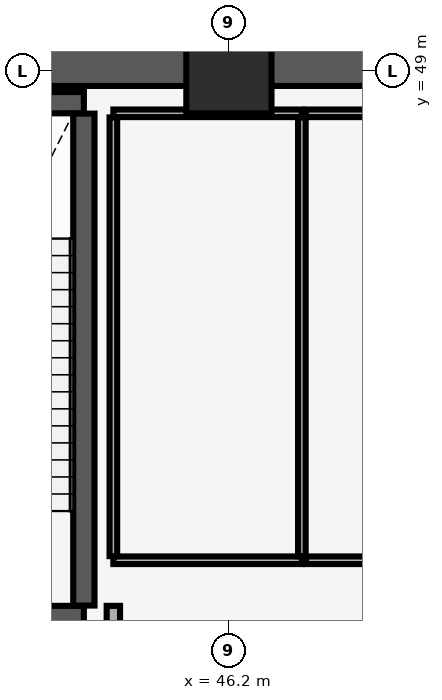
"""IFC4 building model, lengths in metres.
Left out: names, types, materials, properties, quantities, classifications, styles, units other than length and angle.
Written with IfcOpenShell. Run it as: python <this file> out.ifc"""

import sys

from ifc_helpers import new_model, si_unit, direction, frame, frame_2d, origin, origin_2d, place, context, subcontext, project, spatial, rectangle, extrude, element, fill, save


model = new_model("IFC4")
c1 = context("Model", 3, precision=1e-05, world=origin(), true_north=direction((0.0, 1.0)))
c2 = subcontext(c1, "Body", "Model", "MODEL_VIEW")
j1 = project(units=[si_unit("LENGTHUNIT", "METRE"), si_unit("PLANEANGLEUNIT", "RADIAN")], contexts=[c1])
p1 = place(None, origin())
s1 = spatial("IfcSite", under=j1, at=p1, CompositionType="ELEMENT")
p2 = place(p1, origin())
s2 = spatial("IfcBuilding", under=s1, at=p2, CompositionType="ELEMENT")
p3 = place(p2, frame((0.0, 0.0, 8.0)))
s3 = spatial("IfcBuildingStorey", under=s2, at=p3, CompositionType="ELEMENT", Elevation=8.0)
p4 = place(p3, frame((46.2, 49.0, 0.0), z_axis=(0.0, 0.0, 1.0), x_axis=(1.0, 0.0, 0.0)))
e1 = element("IfcColumn", 1, at=p4, inside=s3, PredefinedType="COLUMN", context=c2, shape_type="SweptSolid", body=[
    extrude(rectangle(XDim=1.4, YDim=1.4, at=origin_2d()), origin(), (0.0, 0.0, 1.0), 5.68),
])
p5 = place(p3, frame((16.2, 49.3, 0.0), z_axis=(0.0, 0.0, 1.0), x_axis=(1.0, 0.0, 0.0)))
e2 = element("IfcWall", 2, at=p5, inside=s3, PredefinedType="SHEAR", context=c2, shape_type="SweptSolid", body=[
    extrude(rectangle(XDim=51.6, YDim=1.1, at=frame_2d((25.8, 0.0))), origin(), (0.0, 0.0, 1.0), 5.68),
])
p6 = place(p3, frame((40.185, 40.025, 0.0), z_axis=(0.0, 0.0, 1.0), x_axis=(1.0, 0.0, 0.0)))
e3 = element("IfcWall", 3, at=p6, inside=s3, PredefinedType="SHEAR", context=c2, shape_type="SweptSolid", body=[
    extrude(rectangle(XDim=3.63, YDim=0.35, at=frame_2d((1.815, 0.0))), origin(), (0.0, 0.0, 1.0), 5.68),
])
p7 = place(p6, frame((1.24, 0.0, 0.0)))
e4 = element("IfcOpeningElement", 4, at=p7, cuts=e3, PredefinedType="OPENING", context=c2, shape_type="SweptSolid", body=[
    extrude(rectangle(XDim=1.15, YDim=2.15, at=frame_2d((0.575, 1.075))), frame((0.0, 0.185, 0.0), z_axis=(0.0, -1.0, 0.0), x_axis=(1.0, 0.0, 0.0)), (0.0, 0.0, 1.0), 0.37),
])
p8 = place(p3, frame((40.185, 48.475, 0.0), z_axis=(0.0, 0.0, 1.0), x_axis=(1.0, 0.0, 0.0)))
e5 = element("IfcWall", 5, at=p8, inside=s3, PredefinedType="SHEAR", context=c2, shape_type="SweptSolid", body=[
    extrude(rectangle(XDim=3.63, YDim=0.35, at=frame_2d((1.815, 0.0))), origin(), (0.0, 0.0, 1.0), 5.68),
])
p9 = place(p3, frame((43.815, 40.205, 0.0), z_axis=(0.0, 0.0, 1.0), x_axis=(0.0, 1.0, 0.0)))
e6 = element("IfcWall", 6, at=p9, inside=s3, PredefinedType="SHEAR", context=c2, shape_type="SweptSolid", body=[
    extrude(rectangle(XDim=8.09, YDim=0.35, at=frame_2d((4.045, 0.0))), origin(), (0.0, 0.0, 1.0), 5.68),
])
p10 = place(p3, frame((44.3, 34.415, 0.0), z_axis=(0.0, 0.0, 1.0), x_axis=(0.0, 1.0, 0.0)))
e7 = element("IfcWall", 7, at=p10, inside=s3, PredefinedType="PARTITIONING", context=c2, shape_type="SweptSolid", body=[
    extrude(rectangle(XDim=5.785, YDim=0.22, at=frame_2d((2.893, 0.0))), origin(), (0.0, 0.0, 1.0), 5.68),
])
p11 = place(p3, frame((44.3, 40.95, 0.0), z_axis=(0.0, 0.0, 1.0), x_axis=(1.0, 0.0, 0.0)))
e8 = element("IfcWall", 8, at=p11, inside=s3, PredefinedType="PARTITIONING", context=c2, shape_type="SweptSolid", body=[
    extrude(rectangle(XDim=3.1, YDim=0.125, at=frame_2d((1.55, 0.0))), origin(), (0.0, 0.0, 1.0), 5.68),
])
p12 = place(p11, frame((1.1, 0.0, 0.0)))
e9 = element("IfcOpeningElement", 9, at=p12, cuts=e8, PredefinedType="OPENING", context=c2, shape_type="SweptSolid", body=[
    extrude(rectangle(XDim=0.9, YDim=2.1, at=frame_2d((0.45, 1.05))), frame((0.0, 0.073, 0.0), z_axis=(0.0, -1.0, 0.0), x_axis=(1.0, 0.0, 0.0)), (0.0, 0.0, 1.0), 0.145),
])
p13 = place(p3, frame((44.3, 48.3, 0.0), z_axis=(0.0, 0.0, 1.0), x_axis=(1.0, 0.0, 0.0)))
e10 = element("IfcWall", 10, at=p13, inside=s3, PredefinedType="PARTITIONING", context=c2, shape_type="SweptSolid", body=[
    extrude(rectangle(XDim=3.1, YDim=0.125, at=frame_2d((1.55, 0.0))), origin(), (0.0, 0.0, 1.0), 5.68),
])
for number, where, z_axis, x_axis in (
    (11, (44.3, 41.018, 0.0), (0.0, 0.0, 1.0), (0.0, 1.0, 0.0)),
    (12, (47.4, 41.018, 0.0), (0.0, 0.0, 1.0), (0.0, 1.0, 0.0)),
):
    element("IfcWall", number, at=place(p3, frame(where, z_axis=z_axis, x_axis=x_axis)), inside=s3, PredefinedType="PARTITIONING", context=c2, shape_type="SweptSolid", body=[
        extrude(rectangle(XDim=7.215, YDim=0.125, at=frame_2d((3.607, 0.0))), origin(), (0.0, 0.0, 1.0), 5.68),
    ])
p14 = place(p3, frame((47.468, 40.95, 0.0), z_axis=(0.0, 0.0, 1.0), x_axis=(1.0, 0.0, 0.0)))
e13 = element("IfcWall", 13, at=p14, inside=s3, PredefinedType="PARTITIONING", context=c2, shape_type="SweptSolid", body=[
    extrude(rectangle(XDim=4.932, YDim=0.125, at=frame_2d((2.466, 0.0))), origin(), (0.0, 0.0, 1.0), 5.68),
])
p15 = place(p14, frame((1.982, 0.0, 0.0)))
e14 = element("IfcOpeningElement", 14, at=p15, cuts=e13, PredefinedType="OPENING", context=c2, shape_type="SweptSolid", body=[
    extrude(rectangle(XDim=0.9, YDim=2.1, at=frame_2d((0.45, 1.05))), frame((0.0, 0.073, 0.0), z_axis=(0.0, -1.0, 0.0), x_axis=(1.0, 0.0, 0.0)), (0.0, 0.0, 1.0), 0.145),
])
p16 = place(p3, frame((47.468, 48.3, 0.0), z_axis=(0.0, 0.0, 1.0), x_axis=(1.0, 0.0, 0.0)))
e15 = element("IfcWall", 15, at=p16, inside=s3, PredefinedType="PARTITIONING", context=c2, shape_type="SweptSolid", body=[
    extrude(rectangle(XDim=4.932, YDim=0.125, at=frame_2d((2.466, 0.0))), origin(), (0.0, 0.0, 1.0), 5.68),
])
p17 = place(p12, origin())
e16 = element("IfcDoor", 16, at=p17, inside=s3, OperationType="SINGLE_SWING_RIGHT", PredefinedType="DOOR", context=c2, shape_type="SweptSolid", body=[
    extrude(rectangle(XDim=0.9, YDim=2.1, at=frame_2d((0.45, 1.05))), frame((0.0, 0.025, 0.0), z_axis=(0.0, -1.0, 0.0), x_axis=(1.0, 0.0, 0.0)), (0.0, 0.0, 1.0), 0.05),
])
fill(e9, e16)
save(model, sys.argv[1])
